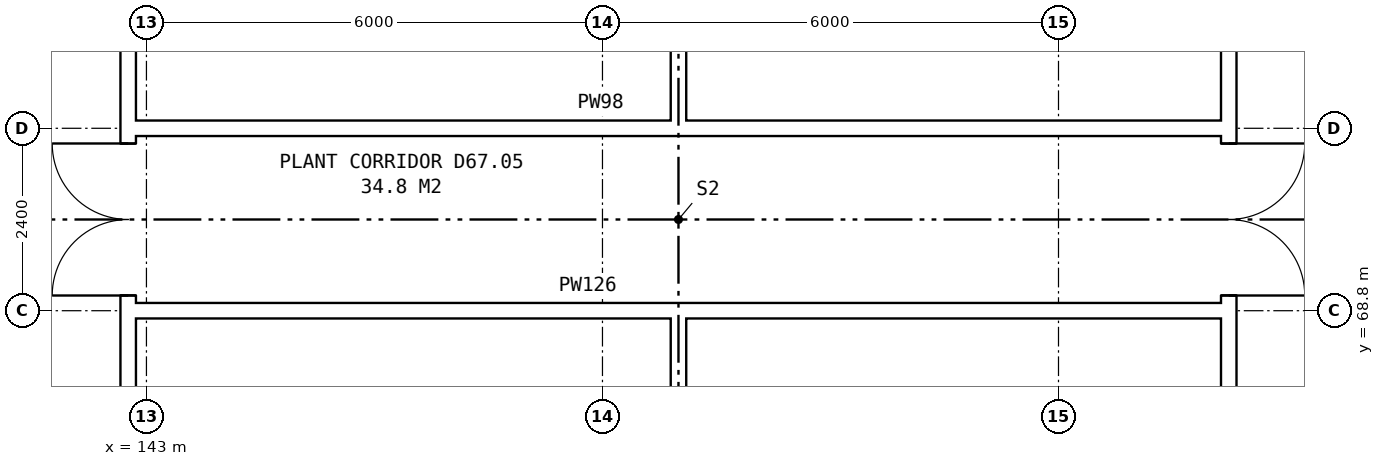
"""IFC4 building model, lengths in metres.
Left out: names, types, materials, properties, quantities, classifications, styles, units other than length and angle.
Written with IfcOpenShell. Run it as: python <this file> out.ifc"""

import sys

from ifc_helpers import new_model, si_unit, direction, frame, frame_2d, origin, place, context, subcontext, project, spatial, rectangle, extrude, element, fill, save


model = new_model("IFC4")
c1 = context("Model", 3, precision=1e-05, world=origin(), true_north=direction((0.0, 1.0)))
c2 = subcontext(c1, "Body", "Model", "MODEL_VIEW")
j1 = project(units=[si_unit("LENGTHUNIT", "METRE"), si_unit("PLANEANGLEUNIT", "RADIAN")], contexts=[c1])
p1 = place(None, origin())
s1 = spatial("IfcSite", under=j1, at=p1, CompositionType="ELEMENT")
p2 = place(p1, origin())
s2 = spatial("IfcBuilding", under=s1, at=p2, CompositionType="ELEMENT")
p3 = place(p2, frame((0.0, 0.0, 236.9)))
s3 = spatial("IfcBuildingStorey", under=s2, at=p3, CompositionType="ELEMENT", Elevation=236.9)
p4 = place(p3, frame((142.76, 63.9, 0.0), z_axis=(0.0, 0.0, 1.0), x_axis=(0.0, 1.0, 0.0)))
e1 = element("IfcWall", 1, at=p4, inside=s3, PredefinedType="PARTITIONING", context=c2, shape_type="SweptSolid", body=[
    extrude(rectangle(XDim=12.2, YDim=0.2, at=frame_2d((6.1, 0.0))), origin(), (0.0, 0.0, 1.0), 6.7),
])
p5 = place(p4, frame((5.1, 0.0, 0.0)))
e2 = element("IfcOpeningElement", 2, at=p5, cuts=e1, PredefinedType="OPENING", context=c2, shape_type="SweptSolid", body=[
    extrude(rectangle(XDim=2.0, YDim=2.1, at=frame_2d((1.0, 1.05))), frame((0.0, 0.11, 0.0), z_axis=(0.0, -1.0, 0.0), x_axis=(1.0, 0.0, 0.0)), (0.0, 0.0, 1.0), 0.22),
])
p6 = place(p3, frame((157.24, 63.9, 0.0), z_axis=(0.0, 0.0, 1.0), x_axis=(0.0, 1.0, 0.0)))
e3 = element("IfcWall", 3, at=p6, inside=s3, PredefinedType="PARTITIONING", context=c2, shape_type="SweptSolid", body=[
    extrude(rectangle(XDim=12.2, YDim=0.2, at=frame_2d((6.1, 0.0))), origin(), (0.0, 0.0, 1.0), 6.7),
])
p7 = place(p6, frame((5.1, 0.0, 0.0)))
e4 = element("IfcOpeningElement", 4, at=p7, cuts=e3, PredefinedType="OPENING", context=c2, shape_type="SweptSolid", body=[
    extrude(rectangle(XDim=2.0, YDim=2.1, at=frame_2d((1.0, 1.05))), frame((0.0, 0.11, 0.0), z_axis=(0.0, -1.0, 0.0), x_axis=(1.0, 0.0, 0.0)), (0.0, 0.0, 1.0), 0.22),
])
for number, where, z_axis, x_axis in (
    (5, (142.76, 68.8, 0.0), (0.0, 0.0, 1.0), (1.0, 0.0, 0.0)),
    (6, (142.76, 71.2, 0.0), (0.0, 0.0, 1.0), (1.0, 0.0, 0.0)),
):
    element("IfcWall", number, at=place(p3, frame(where, z_axis=z_axis, x_axis=x_axis)), inside=s3, PredefinedType="PARTITIONING", context=c2, shape_type="SweptSolid", body=[
        extrude(rectangle(XDim=14.48, YDim=0.2, at=frame_2d((7.24, 0.0))), origin(), (0.0, 0.0, 1.0), 6.7),
    ])
for number, where, z_axis, x_axis in (
    (7, (150.0, 63.7, 0.0), (0.0, 0.0, 1.0), (0.0, 1.0, 0.0)),
    (8, (150.0, 71.1, 0.0), (0.0, 0.0, 1.0), (0.0, 1.0, 0.0)),
):
    element("IfcWall", number, at=place(p3, frame(where, z_axis=z_axis, x_axis=x_axis)), inside=s3, PredefinedType="PARTITIONING", context=c2, shape_type="SweptSolid", body=[
        extrude(rectangle(XDim=5.2, YDim=0.2, at=frame_2d((2.6, 0.0))), origin(), (0.0, 0.0, 1.0), 6.7),
    ])
p8 = place(p5, origin())
e9 = element("IfcDoor", 9, at=p8, inside=s3, OperationType="DOUBLE_DOOR_SINGLE_SWING", PredefinedType="DOOR", context=c2, shape_type="SweptSolid", body=[
    extrude(rectangle(XDim=2.0, YDim=2.1, at=frame_2d((1.0, 1.05))), frame((0.0, 0.025, 0.0), z_axis=(0.0, -1.0, 0.0), x_axis=(1.0, 0.0, 0.0)), (0.0, 0.0, 1.0), 0.05),
])
fill(e2, e9)
p9 = place(p7, frame((2.0, 0.0, 0.0), z_axis=(0.0, 0.0, 1.0), x_axis=(-1.0, 0.0, 0.0)))
e10 = element("IfcDoor", 10, at=p9, inside=s3, OperationType="DOUBLE_DOOR_SINGLE_SWING", PredefinedType="DOOR", context=c2, shape_type="SweptSolid", body=[
    extrude(rectangle(XDim=2.0, YDim=2.1, at=frame_2d((1.0, 1.05))), frame((0.0, 0.025, 0.0), z_axis=(0.0, -1.0, 0.0), x_axis=(1.0, 0.0, 0.0)), (0.0, 0.0, 1.0), 0.05),
])
fill(e4, e10)
save(model, sys.argv[1])
